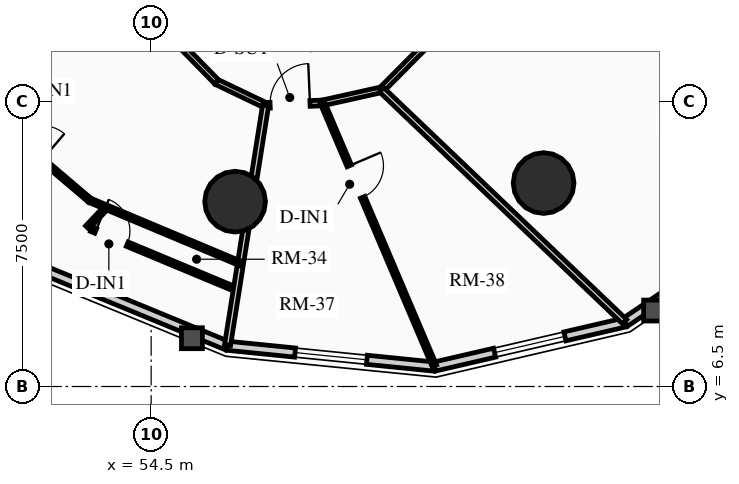
"""IFC4 building model, lengths in metres.
Left out: names, types, materials, properties, quantities, classifications, styles, units other than length and angle.
Written with IfcOpenShell. Run it as: python <this file> out.ifc"""

import sys

from ifc_helpers import new_model, si_unit, direction, frame, frame_2d, origin, origin_2d, place, context, subcontext, project, spatial, rectangle, circle, extrude, source, transform, mapped, element, fill, save


model = new_model("IFC4")
c1 = context("Model", 3, precision=1e-05, world=origin(), true_north=direction((0.0, 1.0)))
c2 = subcontext(c1, "Body", "Model", "MODEL_VIEW")
j1 = project(units=[si_unit("LENGTHUNIT", "METRE"), si_unit("PLANEANGLEUNIT", "RADIAN")], contexts=[c1])
p1 = place(None, origin())
s1 = spatial("IfcSite", under=j1, at=p1, CompositionType="ELEMENT")
p2 = place(p1, origin())
s2 = spatial("IfcBuilding", under=s1, at=p2, CompositionType="ELEMENT")
p3 = place(p2, frame((0.0, 0.0, 62.74)))
s3 = spatial("IfcBuildingStorey", under=s2, at=p3, CompositionType="ELEMENT", Elevation=62.74)
for number, where, z_axis, x_axis in (
    (1, (56.709, 11.365, 0.0), (0.0, 0.0, 1.0), (1.0, 0.0, 0.0)),
    (2, (64.827, 11.854, 0.0), (0.0, 0.0, 1.0), (1.0, 0.0, 0.0)),
):
    element("IfcColumn", number, at=place(p3, frame(where, z_axis=z_axis, x_axis=x_axis)), inside=s3, PredefinedType="USERDEFINED", context=c2, shape_type="SweptSolid", body=[
        extrude(circle(Radius=0.8, at=origin_2d()), origin(), (0.0, 0.0, 1.0), 2.91),
    ])
p4 = place(p3, frame((56.507, 7.572, 0.0), z_axis=(0.0, 0.0, 1.0), x_axis=(-0.924563629567, 0.381027682565, 0.0)))
e3 = element("IfcWall", 3, at=p4, inside=s3, PredefinedType="SOLIDWALL", context=c2, shape_type="SweptSolid", body=[
    extrude(rectangle(XDim=5.789, YDim=0.24, at=frame_2d((2.894, 0.0))), origin(), (0.0, 0.0, 1.0), 2.079),
])
p5 = place(p3, frame((61.957, 7.024, 0.0), z_axis=(0.0, 0.0, 1.0), x_axis=(-0.994970765694, 0.100165739718, 0.0)))
e4 = element("IfcWall", 4, at=p5, inside=s3, PredefinedType="SOLIDWALL", context=c2, shape_type="SweptSolid", body=[
    extrude(rectangle(XDim=5.477, YDim=0.24, at=frame_2d((2.738, 0.0))), origin(), (0.0, 0.0, 1.0), 2.079),
])
m1 = source(origin(), c2, "Body", "SweptSolid", [
    extrude(rectangle(XDim=1.9, YDim=1.35, at=frame_2d((0.95, 0.675))), frame((0.0, 0.13, 0.0), z_axis=(0.0, -1.0, 0.0), x_axis=(1.0, 0.0, 0.0)), (0.0, 0.0, 1.0), 0.26),
])
p6 = place(p5, frame((1.788, 0.0, 0.65)))
e5 = element("IfcOpeningElement", 5, at=p6, cuts=e4, PredefinedType="OPENING", context=c2, shape_type="MappedRepresentation", body=[
    mapped(m1, transform((0.0, 0.0, 0.0), x_axis=(1.0, 0.0, 0.0), y_axis=(0.0, 1.0, 0.0), z_axis=(0.0, 0.0, 1.0), scale=1.0)),
])
p7 = place(p3, frame((66.969, 8.186, 0.0), z_axis=(0.0, 0.0, 1.0), x_axis=(-0.974166016949, -0.225833060959, 0.0)))
e6 = element("IfcWall", 6, at=p7, inside=s3, PredefinedType="SOLIDWALL", context=c2, shape_type="SweptSolid", body=[
    extrude(rectangle(XDim=5.146, YDim=0.24, at=frame_2d((2.573, 0.0))), origin(), (0.0, 0.0, 1.0), 2.079),
])
p8 = place(p7, frame((1.623, 0.0, 0.65)))
e7 = element("IfcOpeningElement", 7, at=p8, cuts=e6, PredefinedType="OPENING", context=c2, shape_type="MappedRepresentation", body=[
    mapped(m1, transform((0.0, 0.0, 0.0), x_axis=(1.0, 0.0, 0.0), y_axis=(0.0, 1.0, 0.0), z_axis=(0.0, 0.0, 1.0), scale=1.0)),
])
p9 = place(p3, frame((71.055, 10.945, 0.0), z_axis=(0.0, 0.0, 1.0), x_axis=(-0.828736708604, -0.559638693991, 0.0)))
e8 = element("IfcWall", 8, at=p9, inside=s3, PredefinedType="SOLIDWALL", context=c2, shape_type="SweptSolid", body=[
    extrude(rectangle(XDim=4.93, YDim=0.24, at=frame_2d((2.465, 0.0))), origin(), (0.0, 0.0, 1.0), 2.079),
])
p10 = place(p3, frame((51.914, 18.914, 0.0), z_axis=(0.0, 0.0, 1.0), x_axis=(0.699999313799, -0.714143515465, 0.0)))
e9 = element("IfcWall", 9, at=p10, inside=s3, PredefinedType="PARTITIONING", context=c2, shape_type="SweptSolid", body=[
    extrude(rectangle(XDim=6.162, YDim=0.15, at=frame_2d((3.081, 0.0))), origin(), (0.0, 0.0, 1.0), 2.079),
])
m2 = source(origin(), c2, "Body", "SweptSolid", [
    extrude(rectangle(XDim=1.05, YDim=2.015, at=frame_2d((0.525, 1.007))), frame((0.0, 0.085, 0.0), z_axis=(0.0, -1.0, 0.0), x_axis=(1.0, 0.0, 0.0)), (0.0, 0.0, 1.0), 0.17),
])
p11 = place(p10, frame((2.556, 0.0, 0.0)))
e10 = element("IfcOpeningElement", 10, at=p11, cuts=e9, PredefinedType="OPENING", context=c2, shape_type="MappedRepresentation", body=[
    mapped(m2, transform((0.0, 0.0, 0.0), x_axis=(1.0, 0.0, 0.0), y_axis=(0.0, 1.0, 0.0), z_axis=(0.0, 0.0, 1.0), scale=1.0)),
])
p12 = place(p3, frame((56.227, 14.513, 0.0), z_axis=(0.0, 0.0, 1.0), x_axis=(0.901477579283, -0.432825801044, 0.0)))
e11 = element("IfcWall", 11, at=p12, inside=s3, PredefinedType="PARTITIONING", context=c2, shape_type="SweptSolid", body=[
    extrude(rectangle(XDim=1.424, YDim=0.15, at=frame_2d((0.712, 0.0))), origin(), (0.0, 0.0, 1.0), 2.125),
])
p13 = place(p3, frame((57.511, 13.897, 0.0), z_axis=(0.0, 0.0, 1.0), x_axis=(0.999024538494, 0.044158481476, 0.0)))
e12 = element("IfcWall", 12, at=p13, inside=s3, PredefinedType="PARTITIONING", context=c2, shape_type="SweptSolid", body=[
    extrude(rectangle(XDim=1.498, YDim=0.15, at=frame_2d((0.749, 0.0))), origin(), (0.0, 0.0, 1.0), 2.079),
])
p14 = place(p13, frame((0.12, 0.0, 0.0)))
e13 = element("IfcOpeningElement", 13, at=p14, cuts=e12, PredefinedType="OPENING", context=c2, shape_type="MappedRepresentation", body=[
    mapped(m2, transform((0.0, 0.0, 0.0), x_axis=(1.0, 0.0, 0.0), y_axis=(0.0, 1.0, 0.0), z_axis=(0.0, 0.0, 1.0), scale=1.0)),
])
p15 = place(p3, frame((59.008, 13.963, 0.0), z_axis=(0.0, 0.0, 1.0), x_axis=(0.976020856791, 0.21767702476, 0.0)))
e14 = element("IfcWall", 14, at=p15, inside=s3, PredefinedType="PARTITIONING", context=c2, shape_type="SweptSolid", body=[
    extrude(rectangle(XDim=1.593, YDim=0.15, at=frame_2d((0.796, 0.0))), origin(), (0.0, 0.0, 1.0), 2.125),
])
p16 = place(p3, frame((60.562, 14.31, 0.0), z_axis=(0.0, 0.0, 1.0), x_axis=(0.704566236161, 0.709638230975, 0.0)))
e15 = element("IfcWall", 15, at=p16, inside=s3, PredefinedType="PARTITIONING", context=c2, shape_type="SweptSolid", body=[
    extrude(rectangle(XDim=3.321, YDim=0.15, at=frame_2d((1.661, 0.0))), origin(), (0.0, 0.0, 1.0), 2.079),
])
p17 = place(p3, frame((57.511, 13.897, 0.0), z_axis=(0.0, 0.0, 1.0), x_axis=(-0.156759846635, -0.98763675027, 0.0)))
e16 = element("IfcWall", 16, at=p17, inside=s3, PredefinedType="PARTITIONING", context=c2, shape_type="SweptSolid", body=[
    extrude(rectangle(XDim=6.384, YDim=0.16, at=frame_2d((3.192, 0.0))), origin(), (0.0, 0.0, 1.0), 2.079),
])
p18 = place(p3, frame((60.562, 14.31, 0.0), z_axis=(0.0, 0.0, 1.0), x_axis=(0.723408813637, -0.690419936236, 0.0)))
e17 = element("IfcWall", 17, at=p18, inside=s3, PredefinedType="PARTITIONING", context=c2, shape_type="SweptSolid", body=[
    extrude(rectangle(XDim=8.844, YDim=0.16, at=frame_2d((4.422, 0.0))), origin(), (0.0, 0.0, 1.0), 2.079),
])
p19 = place(p3, frame((48.3, 15.3, 0.0), z_axis=(0.0, 0.0, 1.0), x_axis=(0.761710135851, -0.647917949236, 0.0)))
e18 = element("IfcWall", 18, at=p19, inside=s3, PredefinedType="PARTITIONING", context=c2, shape_type="SweptSolid", body=[
    extrude(rectangle(XDim=6.02, YDim=0.125, at=frame_2d((3.01, 0.0))), origin(), (0.0, 0.0, 1.0), 2.555),
])
m3 = source(origin(), c2, "Body", "SweptSolid", [
    extrude(rectangle(XDim=0.9, YDim=2.005, at=frame_2d((0.45, 1.002))), frame((0.0, 0.073, 0.0), z_axis=(0.0, -1.0, 0.0), x_axis=(1.0, 0.0, 0.0)), (0.0, 0.0, 1.0), 0.145),
])
p20 = place(p19, frame((3.475, 0.0, 0.0)))
e19 = element("IfcOpeningElement", 19, at=p20, cuts=e18, PredefinedType="OPENING", context=c2, shape_type="MappedRepresentation", body=[
    mapped(m3, transform((0.0, 0.0, 0.0), x_axis=(1.0, 0.0, 0.0), y_axis=(0.0, 1.0, 0.0), z_axis=(0.0, 0.0, 1.0), scale=1.0)),
])
p21 = place(p3, frame((52.886, 11.4, 0.0), z_axis=(0.0, 0.0, 1.0), x_axis=(0.922079377612, -0.38700080282, 0.0)))
e20 = element("IfcWall", 20, at=p21, inside=s3, PredefinedType="PARTITIONING", context=c2, shape_type="SweptSolid", body=[
    extrude(rectangle(XDim=4.3, YDim=0.125, at=frame_2d((2.15, 0.0))), origin(), (0.0, 0.0, 1.0), 2.079),
])
p22 = place(p3, frame((53.275, 11.167, 0.0), z_axis=(0.0, 0.0, 1.0), x_axis=(-0.686191026002, -0.727421388079, 0.0)))
e21 = element("IfcWall", 21, at=p22, inside=s3, PredefinedType="PARTITIONING", context=c2, shape_type="SweptSolid", body=[
    extrude(rectangle(XDim=0.663, YDim=0.125, at=frame_2d((0.332, 0.0))), origin(), (0.0, 0.0, 1.0), 2.555),
])
p23 = place(p3, frame((52.93, 10.638, 0.0), z_axis=(0.0, 0.0, 1.0), x_axis=(0.923065985722, -0.384641633217, 0.0)))
e22 = element("IfcWall", 22, at=p23, inside=s3, PredefinedType="PARTITIONING", context=c2, shape_type="SweptSolid", body=[
    extrude(rectangle(XDim=3.963, YDim=0.125, at=frame_2d((1.981, 0.0))), origin(), (0.0, 0.0, 1.0), 2.079),
])
p24 = place(p23, frame((0.12, 0.0, 0.0)))
e23 = element("IfcOpeningElement", 23, at=p24, cuts=e22, PredefinedType="OPENING", context=c2, shape_type="MappedRepresentation", body=[
    mapped(m3, transform((0.0, 0.0, 0.0), x_axis=(1.0, 0.0, 0.0), y_axis=(0.0, 1.0, 0.0), z_axis=(0.0, 0.0, 1.0), scale=1.0)),
])
p25 = place(p3, frame((59.008, 13.963, 0.0), z_axis=(0.0, 0.0, 1.0), x_axis=(0.391653414374, -0.920112820805, 0.0)))
e24 = element("IfcWall", 24, at=p25, inside=s3, PredefinedType="PARTITIONING", context=c2, shape_type="SweptSolid", body=[
    extrude(rectangle(XDim=7.52, YDim=0.125, at=frame_2d((3.76, 0.0))), origin(), (0.0, 0.0, 1.0), 2.079),
])
p26 = place(p25, frame((1.8, 0.0, 0.0)))
e25 = element("IfcOpeningElement", 25, at=p26, cuts=e24, PredefinedType="OPENING", context=c2, shape_type="MappedRepresentation", body=[
    mapped(m3, transform((0.0, 0.0, 0.0), x_axis=(1.0, 0.0, 0.0), y_axis=(0.0, 1.0, 0.0), z_axis=(0.0, 0.0, 1.0), scale=1.0)),
])
m4 = source(origin(), c2, "Body", "SweptSolid", [
    extrude(rectangle(XDim=1.9, YDim=1.35, at=frame_2d((0.95, 0.675))), frame((0.0, 0.03, 0.0), z_axis=(0.0, -1.0, 0.0), x_axis=(1.0, 0.0, 0.0)), (0.0, 0.0, 1.0), 0.06),
])
p27 = place(p6, origin())
e26 = element("IfcWindow", 26, at=p27, inside=s3, PartitioningType="DOUBLE_PANEL_VERTICAL", PredefinedType="WINDOW", context=c2, shape_type="MappedRepresentation", body=[
    mapped(m4, transform((0.0, 0.0, 0.0), x_axis=(1.0, 0.0, 0.0), y_axis=(0.0, 1.0, 0.0), z_axis=(0.0, 0.0, 1.0), scale=1.0)),
])
fill(e5, e26)
p28 = place(p8, origin())
e27 = element("IfcWindow", 27, at=p28, inside=s3, PartitioningType="DOUBLE_PANEL_VERTICAL", PredefinedType="WINDOW", context=c2, shape_type="MappedRepresentation", body=[
    mapped(m4, transform((0.0, 0.0, 0.0), x_axis=(1.0, 0.0, 0.0), y_axis=(0.0, 1.0, 0.0), z_axis=(0.0, 0.0, 1.0), scale=1.0)),
])
fill(e7, e27)
m5 = source(origin(), c2, "Body", "SweptSolid", [
    extrude(rectangle(XDim=0.9, YDim=2.005, at=frame_2d((0.45, 1.002))), frame((0.0, 0.025, 0.0), z_axis=(0.0, -1.0, 0.0), x_axis=(1.0, 0.0, 0.0)), (0.0, 0.0, 1.0), 0.05),
])
p29 = place(p24, origin())
e28 = element("IfcDoor", 28, at=p29, inside=s3, OperationType="SINGLE_SWING_LEFT", PredefinedType="DOOR", context=c2, shape_type="MappedRepresentation", body=[
    mapped(m5, transform((0.0, 0.0, 0.0), x_axis=(1.0, 0.0, 0.0), y_axis=(0.0, 1.0, 0.0), z_axis=(0.0, 0.0, 1.0), scale=1.0)),
])
fill(e23, e28)
m6 = source(origin(), c2, "Body", "SweptSolid", [
    extrude(rectangle(XDim=1.05, YDim=2.015, at=frame_2d((0.525, 1.007))), frame((0.0, 0.025, 0.0), z_axis=(0.0, -1.0, 0.0), x_axis=(1.0, 0.0, 0.0)), (0.0, 0.0, 1.0), 0.05),
])
p30 = place(p14, origin())
e29 = element("IfcDoor", 29, at=p30, inside=s3, OperationType="SINGLE_SWING_RIGHT", PredefinedType="DOOR", context=c2, shape_type="MappedRepresentation", body=[
    mapped(m6, transform((0.0, 0.0, 0.0), x_axis=(1.0, 0.0, 0.0), y_axis=(0.0, 1.0, 0.0), z_axis=(0.0, 0.0, 1.0), scale=1.0)),
])
fill(e13, e29)
p31 = place(p26, origin())
e30 = element("IfcDoor", 30, at=p31, inside=s3, OperationType="SINGLE_SWING_LEFT", PredefinedType="DOOR", context=c2, shape_type="MappedRepresentation", body=[
    mapped(m5, transform((0.0, 0.0, 0.0), x_axis=(1.0, 0.0, 0.0), y_axis=(0.0, 1.0, 0.0), z_axis=(0.0, 0.0, 1.0), scale=1.0)),
])
fill(e25, e30)
save(model, sys.argv[1])
